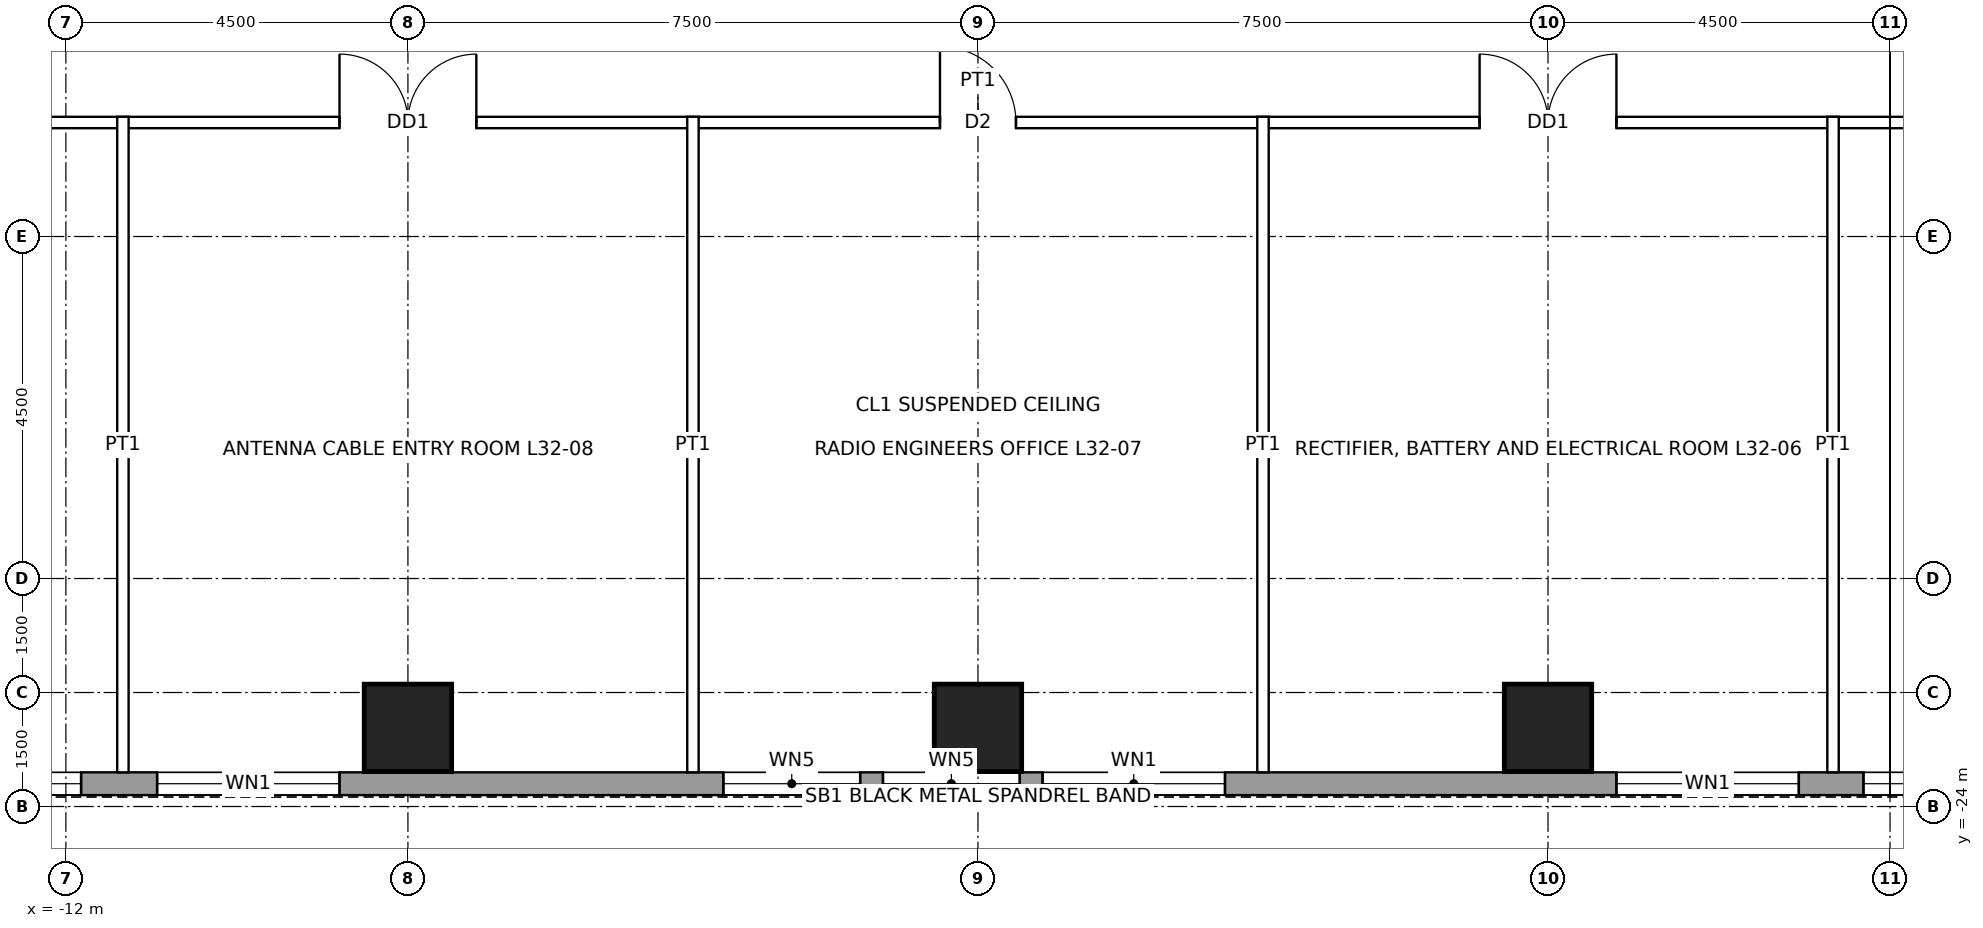
"""IFC4 building model, lengths in metres.
Left out: names, types, materials, properties, quantities, classifications, styles, units other than length and angle.
Written with IfcOpenShell. Run it as: python <this file> out.ifc"""

import sys

from ifc_helpers import new_model, si_unit, direction, frame, frame_2d, origin, origin_2d, place, context, subcontext, project, spatial, rectangle, hollow_rectangle, extrude, element, fill, save


model = new_model("IFC4")
c1 = context("Model", 3, precision=1e-05, world=origin(), true_north=direction((0.0, 1.0)))
c2 = subcontext(c1, "Body", "Model", "MODEL_VIEW")
j1 = project(units=[si_unit("LENGTHUNIT", "METRE"), si_unit("PLANEANGLEUNIT", "RADIAN")], contexts=[c1])
p1 = place(None, origin())
s1 = spatial("IfcSite", under=j1, at=p1, CompositionType="ELEMENT")
p2 = place(p1, origin())
s2 = spatial("IfcBuilding", under=s1, at=p2, CompositionType="ELEMENT")
p3 = place(p2, frame((0.0, 0.0, 158.4)))
s3 = spatial("IfcBuildingStorey", under=s2, at=p3, CompositionType="ELEMENT", Elevation=158.4)
for number, where, z_axis, x_axis in (
    (1, (7.5, -22.965, 0.0), (0.0, 0.0, 1.0), (1.0, 0.0, 0.0)),
    (2, (0.0, -22.965, 0.0), (0.0, 0.0, 1.0), (1.0, 0.0, 0.0)),
    (3, (-7.5, -22.965, 0.0), (0.0, 0.0, 1.0), (1.0, 0.0, 0.0)),
):
    element("IfcColumn", number, at=place(p3, frame(where, z_axis=z_axis, x_axis=x_axis)), inside=s3, PredefinedType="COLUMN", context=c2, shape_type="SweptSolid", body=[
        extrude(hollow_rectangle(XDim=1.15, YDim=1.15, WallThickness=0.075, at=origin_2d()), origin(), (0.0, 0.0, 1.0), 4.5),
    ])
p4 = place(p3, frame((16.2, -23.7, 0.0), z_axis=(0.0, 0.0, 1.0), x_axis=(-1.0, 0.0, 0.0)))
e4 = element("IfcWall", 4, at=p4, inside=s3, PredefinedType="SOLIDWALL", context=c2, shape_type="SweptSolid", body=[
    extrude(rectangle(XDim=32.4, YDim=0.3, at=frame_2d((16.2, 0.0))), origin(), (0.0, 0.0, 1.0), 4.3),
])
p5 = place(p4, frame((0.65, 0.0, 1.0)))
e5 = element("IfcOpeningElement", 5, at=p5, cuts=e4, PredefinedType="OPENING", context=c2, shape_type="SweptSolid", body=[
    extrude(rectangle(XDim=1.8, YDim=1.2, at=frame_2d((0.9, 0.6))), frame((0.0, 0.16, 0.0), z_axis=(0.0, -1.0, 0.0), x_axis=(1.0, 0.0, 0.0)), (0.0, 0.0, 1.0), 0.32),
])
p6 = place(p4, frame((2.75, 0.0, 1.0)))
e6 = element("IfcOpeningElement", 6, at=p6, cuts=e4, PredefinedType="OPENING", context=c2, shape_type="SweptSolid", body=[
    extrude(rectangle(XDim=1.8, YDim=1.2, at=frame_2d((0.9, 0.6))), frame((0.0, 0.16, 0.0), z_axis=(0.0, -1.0, 0.0), x_axis=(1.0, 0.0, 0.0)), (0.0, 0.0, 1.0), 0.32),
])
p7 = place(p4, frame((5.4, 0.0, 1.0)))
e7 = element("IfcOpeningElement", 7, at=p7, cuts=e4, PredefinedType="OPENING", context=c2, shape_type="SweptSolid", body=[
    extrude(rectangle(XDim=2.4, YDim=1.2, at=frame_2d((1.2, 0.6))), frame((0.0, 0.16, 0.0), z_axis=(0.0, -1.0, 0.0), x_axis=(1.0, 0.0, 0.0)), (0.0, 0.0, 1.0), 0.32),
])
p8 = place(p4, frame((12.95, 0.0, 1.0)))
e8 = element("IfcOpeningElement", 8, at=p8, cuts=e4, PredefinedType="OPENING", context=c2, shape_type="SweptSolid", body=[
    extrude(rectangle(XDim=2.4, YDim=1.2, at=frame_2d((1.2, 0.6))), frame((0.0, 0.16, 0.0), z_axis=(0.0, -1.0, 0.0), x_axis=(1.0, 0.0, 0.0)), (0.0, 0.0, 1.0), 0.32),
])
p9 = place(p4, frame((15.65, 0.0, 1.0)))
e9 = element("IfcOpeningElement", 9, at=p9, cuts=e4, PredefinedType="OPENING", context=c2, shape_type="SweptSolid", body=[
    extrude(rectangle(XDim=1.8, YDim=1.2, at=frame_2d((0.9, 0.6))), frame((0.0, 0.16, 0.0), z_axis=(0.0, -1.0, 0.0), x_axis=(1.0, 0.0, 0.0)), (0.0, 0.0, 1.0), 0.32),
])
p10 = place(p4, frame((17.75, 0.0, 1.0)))
e10 = element("IfcOpeningElement", 10, at=p10, cuts=e4, PredefinedType="OPENING", context=c2, shape_type="SweptSolid", body=[
    extrude(rectangle(XDim=1.8, YDim=1.2, at=frame_2d((0.9, 0.6))), frame((0.0, 0.16, 0.0), z_axis=(0.0, -1.0, 0.0), x_axis=(1.0, 0.0, 0.0)), (0.0, 0.0, 1.0), 0.32),
])
p11 = place(p4, frame((24.6, 0.0, 1.0)))
e11 = element("IfcOpeningElement", 11, at=p11, cuts=e4, PredefinedType="OPENING", context=c2, shape_type="SweptSolid", body=[
    extrude(rectangle(XDim=2.4, YDim=1.2, at=frame_2d((1.2, 0.6))), frame((0.0, 0.16, 0.0), z_axis=(0.0, -1.0, 0.0), x_axis=(1.0, 0.0, 0.0)), (0.0, 0.0, 1.0), 0.32),
])
p12 = place(p4, frame((28.0, 0.0, 1.0)))
e12 = element("IfcOpeningElement", 12, at=p12, cuts=e4, PredefinedType="OPENING", context=c2, shape_type="SweptSolid", body=[
    extrude(rectangle(XDim=2.4, YDim=1.2, at=frame_2d((1.2, 0.6))), frame((0.0, 0.16, 0.0), z_axis=(0.0, -1.0, 0.0), x_axis=(1.0, 0.0, 0.0)), (0.0, 0.0, 1.0), 0.32),
])
p13 = place(p3, frame((-15.075, -15.0, 0.0), z_axis=(0.0, 0.0, 1.0), x_axis=(1.0, 0.0, 0.0)))
e13 = element("IfcWall", 13, at=p13, inside=s3, PredefinedType="PARTITIONING", context=c2, shape_type="SweptSolid", body=[
    extrude(rectangle(XDim=30.15, YDim=0.15, at=frame_2d((15.075, 0.0))), origin(), (0.0, 0.0, 1.0), 4.3),
])
p14 = place(p13, frame((21.675, 0.0, 0.0)))
e14 = element("IfcOpeningElement", 14, at=p14, cuts=e13, PredefinedType="OPENING", context=c2, shape_type="SweptSolid", body=[
    extrude(rectangle(XDim=1.8, YDim=2.4, at=frame_2d((0.9, 1.2))), frame((0.0, 0.085, 0.0), z_axis=(0.0, -1.0, 0.0), x_axis=(1.0, 0.0, 0.0)), (0.0, 0.0, 1.0), 0.17),
])
p15 = place(p13, frame((14.575, 0.0, 0.0)))
e15 = element("IfcOpeningElement", 15, at=p15, cuts=e13, PredefinedType="OPENING", context=c2, shape_type="SweptSolid", body=[
    extrude(rectangle(XDim=1.0, YDim=2.1, at=frame_2d((0.5, 1.05))), frame((0.0, 0.085, 0.0), z_axis=(0.0, -1.0, 0.0), x_axis=(1.0, 0.0, 0.0)), (0.0, 0.0, 1.0), 0.17),
])
p16 = place(p13, frame((6.675, 0.0, 0.0)))
e16 = element("IfcOpeningElement", 16, at=p16, cuts=e13, PredefinedType="OPENING", context=c2, shape_type="SweptSolid", body=[
    extrude(rectangle(XDim=1.8, YDim=2.4, at=frame_2d((0.9, 1.2))), frame((0.0, 0.085, 0.0), z_axis=(0.0, -1.0, 0.0), x_axis=(1.0, 0.0, 0.0)), (0.0, 0.0, 1.0), 0.17),
])
p17 = place(p13, frame((27.7, 0.0, 0.0)))
e17 = element("IfcOpeningElement", 17, at=p17, cuts=e13, PredefinedType="OPENING", context=c2, shape_type="SweptSolid", body=[
    extrude(rectangle(XDim=1.0, YDim=2.1, at=frame_2d((0.5, 1.05))), frame((0.0, 0.085, 0.0), z_axis=(0.0, -1.0, 0.0), x_axis=(1.0, 0.0, 0.0)), (0.0, 0.0, 1.0), 0.17),
])
p18 = place(p13, frame((1.45, 0.0, 0.0)))
e18 = element("IfcOpeningElement", 18, at=p18, cuts=e13, PredefinedType="OPENING", context=c2, shape_type="SweptSolid", body=[
    extrude(rectangle(XDim=1.0, YDim=2.1, at=frame_2d((0.5, 1.05))), frame((0.0, 0.085, 0.0), z_axis=(0.0, -1.0, 0.0), x_axis=(1.0, 0.0, 0.0)), (0.0, 0.0, 1.0), 0.17),
])
for number, where, z_axis, x_axis in (
    (19, (-11.25, -23.55, 0.0), (0.0, 0.0, 1.0), (0.0, 1.0, 0.0)),
    (20, (-3.75, -23.55, 0.0), (0.0, 0.0, 1.0), (0.0, 1.0, 0.0)),
    (21, (3.75, -23.55, 0.0), (0.0, 0.0, 1.0), (0.0, 1.0, 0.0)),
    (22, (11.25, -23.55, 0.0), (0.0, 0.0, 1.0), (0.0, 1.0, 0.0)),
):
    element("IfcWall", number, at=place(p3, frame(where, z_axis=z_axis, x_axis=x_axis)), inside=s3, PredefinedType="PARTITIONING", context=c2, shape_type="SweptSolid", body=[
        extrude(rectangle(XDim=8.625, YDim=0.15, at=frame_2d((4.312, 0.0))), origin(), (0.0, 0.0, 1.0), 3.431),
    ])
p19 = place(p6, origin())
e23 = element("IfcWindow", 23, at=p19, inside=s3, PartitioningType="SINGLE_PANEL", PredefinedType="WINDOW", context=c2, shape_type="SweptSolid", body=[
    extrude(rectangle(XDim=1.8, YDim=1.2, at=frame_2d((0.9, 0.6))), frame((0.0, 0.03, 0.0), z_axis=(0.0, -1.0, 0.0), x_axis=(1.0, 0.0, 0.0)), (0.0, 0.0, 1.0), 0.06),
])
fill(e6, e23)
p20 = place(p7, origin())
e24 = element("IfcWindow", 24, at=p20, inside=s3, PartitioningType="SINGLE_PANEL", PredefinedType="WINDOW", context=c2, shape_type="SweptSolid", body=[
    extrude(rectangle(XDim=2.4, YDim=1.2, at=frame_2d((1.2, 0.6))), frame((0.0, 0.03, 0.0), z_axis=(0.0, -1.0, 0.0), x_axis=(1.0, 0.0, 0.0)), (0.0, 0.0, 1.0), 0.06),
])
fill(e7, e24)
p21 = place(p8, origin())
e25 = element("IfcWindow", 25, at=p21, inside=s3, PartitioningType="SINGLE_PANEL", PredefinedType="WINDOW", context=c2, shape_type="SweptSolid", body=[
    extrude(rectangle(XDim=2.4, YDim=1.2, at=frame_2d((1.2, 0.6))), frame((0.0, 0.03, 0.0), z_axis=(0.0, -1.0, 0.0), x_axis=(1.0, 0.0, 0.0)), (0.0, 0.0, 1.0), 0.06),
])
fill(e8, e25)
p22 = place(p9, origin())
e26 = element("IfcWindow", 26, at=p22, inside=s3, PartitioningType="SINGLE_PANEL", PredefinedType="WINDOW", context=c2, shape_type="SweptSolid", body=[
    extrude(rectangle(XDim=1.8, YDim=1.2, at=frame_2d((0.9, 0.6))), frame((0.0, 0.03, 0.0), z_axis=(0.0, -1.0, 0.0), x_axis=(1.0, 0.0, 0.0)), (0.0, 0.0, 1.0), 0.06),
])
fill(e9, e26)
p23 = place(p10, origin())
e27 = element("IfcWindow", 27, at=p23, inside=s3, PartitioningType="SINGLE_PANEL", PredefinedType="WINDOW", context=c2, shape_type="SweptSolid", body=[
    extrude(rectangle(XDim=1.8, YDim=1.2, at=frame_2d((0.9, 0.6))), frame((0.0, 0.03, 0.0), z_axis=(0.0, -1.0, 0.0), x_axis=(1.0, 0.0, 0.0)), (0.0, 0.0, 1.0), 0.06),
])
fill(e10, e27)
p24 = place(p11, origin())
e28 = element("IfcWindow", 28, at=p24, inside=s3, PartitioningType="SINGLE_PANEL", PredefinedType="WINDOW", context=c2, shape_type="SweptSolid", body=[
    extrude(rectangle(XDim=2.4, YDim=1.2, at=frame_2d((1.2, 0.6))), frame((0.0, 0.03, 0.0), z_axis=(0.0, -1.0, 0.0), x_axis=(1.0, 0.0, 0.0)), (0.0, 0.0, 1.0), 0.06),
])
fill(e11, e28)
p25 = place(p12, origin())
e29 = element("IfcWindow", 29, at=p25, inside=s3, PartitioningType="SINGLE_PANEL", PredefinedType="WINDOW", context=c2, shape_type="SweptSolid", body=[
    extrude(rectangle(XDim=2.4, YDim=1.2, at=frame_2d((1.2, 0.6))), frame((0.0, 0.03, 0.0), z_axis=(0.0, -1.0, 0.0), x_axis=(1.0, 0.0, 0.0)), (0.0, 0.0, 1.0), 0.06),
])
fill(e12, e29)
p26 = place(p14, origin())
e30 = element("IfcDoor", 30, at=p26, inside=s3, OperationType="DOUBLE_DOOR_SINGLE_SWING", PredefinedType="DOOR", context=c2, shape_type="SweptSolid", body=[
    extrude(rectangle(XDim=1.8, YDim=2.4, at=frame_2d((0.9, 1.2))), frame((0.0, 0.025, 0.0), z_axis=(0.0, -1.0, 0.0), x_axis=(1.0, 0.0, 0.0)), (0.0, 0.0, 1.0), 0.05),
])
fill(e14, e30)
p27 = place(p15, origin())
e31 = element("IfcDoor", 31, at=p27, inside=s3, OperationType="SINGLE_SWING_LEFT", PredefinedType="DOOR", context=c2, shape_type="SweptSolid", body=[
    extrude(rectangle(XDim=1.0, YDim=2.1, at=frame_2d((0.5, 1.05))), frame((0.0, 0.025, 0.0), z_axis=(0.0, -1.0, 0.0), x_axis=(1.0, 0.0, 0.0)), (0.0, 0.0, 1.0), 0.05),
])
fill(e15, e31)
p28 = place(p16, origin())
e32 = element("IfcDoor", 32, at=p28, inside=s3, OperationType="DOUBLE_DOOR_SINGLE_SWING", PredefinedType="DOOR", context=c2, shape_type="SweptSolid", body=[
    extrude(rectangle(XDim=1.8, YDim=2.4, at=frame_2d((0.9, 1.2))), frame((0.0, 0.025, 0.0), z_axis=(0.0, -1.0, 0.0), x_axis=(1.0, 0.0, 0.0)), (0.0, 0.0, 1.0), 0.05),
])
fill(e16, e32)
save(model, sys.argv[1])
